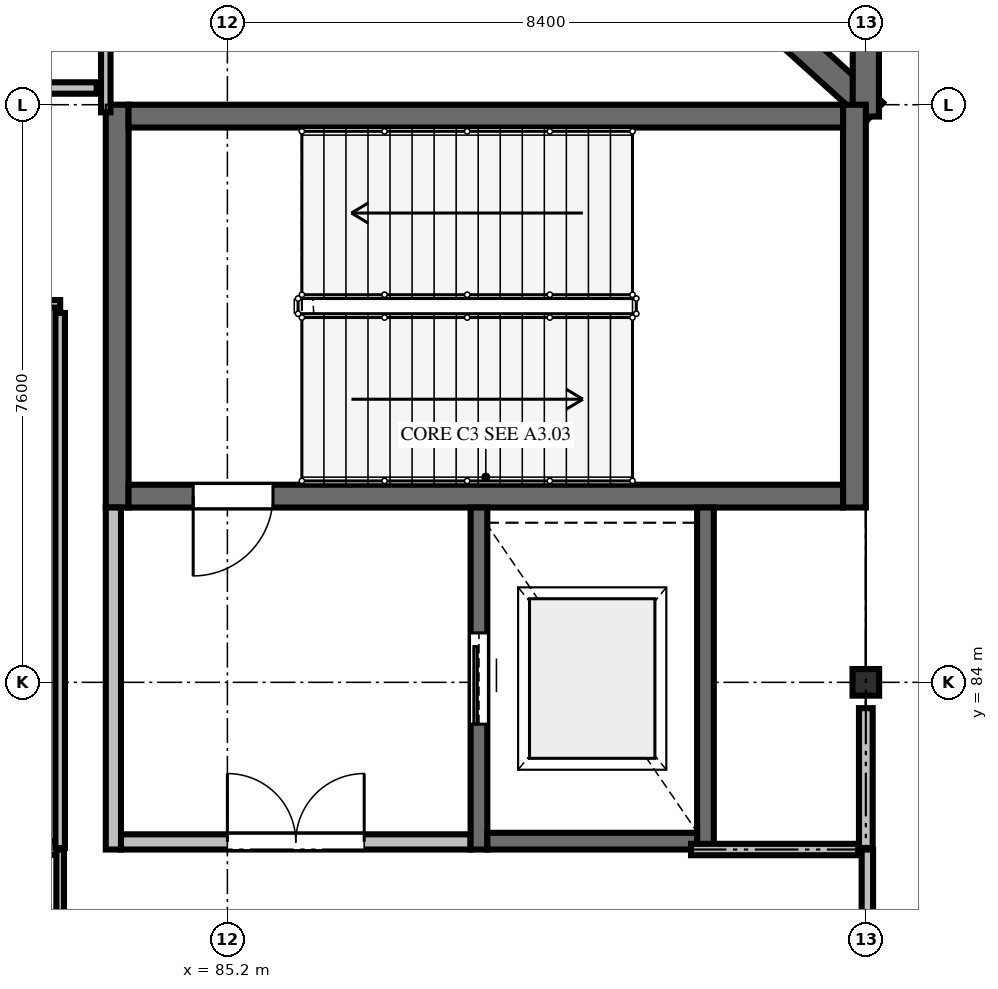
"""IFC4 building model, lengths in metres.
Left out: names, types, materials, properties, quantities, classifications, styles, units other than length and angle.
Written with IfcOpenShell. Run it as: python <this file> out.ifc"""

import sys

from ifc_helpers import new_model, si_unit, direction, frame, frame_2d, origin, origin_2d, place, context, subcontext, project, spatial, rectangle, i_section, extrude, element, fill, save


model = new_model("IFC4")
c1 = context("Model", 3, precision=1e-05, world=origin(), true_north=direction((0.0, 1.0)))
c2 = subcontext(c1, "Body", "Model", "MODEL_VIEW")
j1 = project(units=[si_unit("LENGTHUNIT", "METRE"), si_unit("PLANEANGLEUNIT", "RADIAN")], contexts=[c1])
p1 = place(None, origin())
s1 = spatial("IfcSite", under=j1, at=p1, CompositionType="ELEMENT")
p2 = place(p1, origin())
s2 = spatial("IfcBuilding", under=s1, at=p2, CompositionType="ELEMENT")
p3 = place(p2, frame((0.0, 0.0, 5.4)))
s3 = spatial("IfcBuildingStorey", under=s2, at=p3, CompositionType="ELEMENT", Elevation=5.4)
p4 = place(p3, frame((93.6, 84.0, 0.0), z_axis=(0.0, 0.0, 1.0), x_axis=(1.0, 0.0, 0.0)))
e1 = element("IfcColumn", 1, at=p4, inside=s3, PredefinedType="COLUMN", context=c2, shape_type="SweptSolid", body=[
    extrude(i_section(OverallWidth=0.35, OverallDepth=0.35, WebThickness=0.012, FlangeThickness=0.019, FilletRadius=0.013, at=origin_2d()), origin(), (0.0, 0.0, 1.0), 5.4),
])
p5 = place(p3, frame((89.277, 95.511, 0.0), z_axis=(0.0, 0.0, 1.0), x_axis=(0.741537713453, -0.670911186021, 0.0)))
e2 = element("IfcWall", 2, at=p5, inside=s3, PredefinedType="SOLIDWALL", context=c2, shape_type="SweptSolid", body=[
    extrude(rectangle(XDim=5.98, YDim=0.345, at=frame_2d((2.99, 0.0))), origin(), (0.0, 0.0, 1.0), 4.268),
])
p6 = place(p3, frame((93.6, 91.444, 0.0), z_axis=(0.0, 0.0, 1.0), x_axis=(0.0, 1.0, 0.0)))
e3 = element("IfcWall", 3, at=p6, inside=s3, PredefinedType="SOLIDWALL", context=c2, shape_type="SweptSolid", body=[
    extrude(rectangle(XDim=7.21, YDim=0.345, at=frame_2d((3.605, 0.0))), origin(), (0.0, 0.0, 1.0), 4.268),
])
for number, where, z_axis, x_axis in (
    (4, (83.75, 86.3, 0.0), (0.0, 0.0, 1.0), (0.0, 1.0, 0.0)),
    (5, (93.45, 91.6, 0.0), (0.0, 0.0, 1.0), (0.0, -1.0, 0.0)),
):
    element("IfcWall", number, at=place(p3, frame(where, z_axis=z_axis, x_axis=x_axis)), inside=s3, PredefinedType="SHEAR", context=c2, shape_type="SweptSolid", body=[
        extrude(rectangle(XDim=5.3, YDim=0.3, at=frame_2d((2.65, 0.0))), origin(), (0.0, 0.0, 1.0), 4.98),
    ])
p7 = place(p3, frame((93.3, 86.45, 0.0), z_axis=(0.0, 0.0, 1.0), x_axis=(-1.0, 0.0, 0.0)))
e6 = element("IfcWall", 6, at=p7, inside=s3, PredefinedType="SHEAR", context=c2, shape_type="SweptSolid", body=[
    extrude(rectangle(XDim=9.4, YDim=0.3, at=frame_2d((4.7, 0.0))), origin(), (0.0, 0.0, 1.0), 4.98),
])
p8 = place(p7, frame((7.5, 0.0, 0.0)))
e7 = element("IfcOpeningElement", 7, at=p8, cuts=e6, PredefinedType="OPENING", context=c2, shape_type="SweptSolid", body=[
    extrude(rectangle(XDim=1.05, YDim=2.2, at=frame_2d((0.525, 1.1))), frame((0.0, 0.16, 0.0), z_axis=(0.0, -1.0, 0.0), x_axis=(1.0, 0.0, 0.0)), (0.0, 0.0, 1.0), 0.32),
])
p9 = place(p3, frame((83.9, 91.45, 0.0), z_axis=(0.0, 0.0, 1.0), x_axis=(1.0, 0.0, 0.0)))
e8 = element("IfcWall", 8, at=p9, inside=s3, PredefinedType="SHEAR", context=c2, shape_type="SweptSolid", body=[
    extrude(rectangle(XDim=9.4, YDim=0.3, at=frame_2d((4.7, 0.0))), origin(), (0.0, 0.0, 1.0), 4.98),
])
p10 = place(p3, frame((83.8, 81.9, 0.0), z_axis=(0.0, 0.0, 1.0), x_axis=(1.0, 0.0, 0.0)))
e9 = element("IfcWall", 9, at=p10, inside=s3, PredefinedType="SOLIDWALL", context=c2, shape_type="SweptSolid", body=[
    extrude(rectangle(XDim=4.6, YDim=0.2, at=frame_2d((2.3, 0.0))), origin(), (0.0, 0.0, 1.0), 4.27),
])
p11 = place(p10, frame((1.4, 0.0, 0.0)))
e10 = element("IfcOpeningElement", 10, at=p11, cuts=e9, PredefinedType="OPENING", context=c2, shape_type="SweptSolid", body=[
    extrude(rectangle(XDim=1.8, YDim=2.2, at=frame_2d((0.9, 1.1))), frame((0.0, 0.11, 0.0), z_axis=(0.0, -1.0, 0.0), x_axis=(1.0, 0.0, 0.0)), (0.0, 0.0, 1.0), 0.22),
])
p12 = place(p3, frame((83.7, 81.8, 0.0), z_axis=(0.0, 0.0, 1.0), x_axis=(0.0, 1.0, 0.0)))
e11 = element("IfcWall", 11, at=p12, inside=s3, PredefinedType="SOLIDWALL", context=c2, shape_type="SweptSolid", body=[
    extrude(rectangle(XDim=4.5, YDim=0.2, at=frame_2d((2.25, 0.0))), origin(), (0.0, 0.0, 1.0), 4.27),
])
p13 = place(p3, frame((88.51, 81.8, 0.0), z_axis=(0.0, 0.0, 1.0), x_axis=(0.0, 1.0, 0.0)))
e12 = element("IfcWall", 12, at=p13, inside=s3, PredefinedType="SOLIDWALL", context=c2, shape_type="SweptSolid", body=[
    extrude(rectangle(XDim=4.5, YDim=0.22, at=frame_2d((2.25, 0.0))), origin(), (0.0, 0.0, 1.0), 4.98),
])
p14 = place(p13, frame((1.65, 0.0, 0.0)))
e13 = element("IfcOpeningElement", 13, at=p14, cuts=e12, PredefinedType="OPENING", context=c2, shape_type="SweptSolid", body=[
    extrude(rectangle(XDim=1.2, YDim=2.2, at=frame_2d((0.6, 1.1))), frame((0.0, 0.12, 0.0), z_axis=(0.0, -1.0, 0.0), x_axis=(1.0, 0.0, 0.0)), (0.0, 0.0, 1.0), 0.24),
])
p15 = place(p3, frame((91.49, 81.8, 0.0), z_axis=(0.0, 0.0, 1.0), x_axis=(0.0, 1.0, 0.0)))
e14 = element("IfcWall", 14, at=p15, inside=s3, PredefinedType="SOLIDWALL", context=c2, shape_type="SweptSolid", body=[
    extrude(rectangle(XDim=4.5, YDim=0.22, at=frame_2d((2.25, 0.0))), origin(), (0.0, 0.0, 1.0), 4.98),
])
p16 = place(p3, frame((88.62, 81.91, 0.0), z_axis=(0.0, 0.0, 1.0), x_axis=(1.0, 0.0, 0.0)))
e15 = element("IfcWall", 15, at=p16, inside=s3, PredefinedType="SOLIDWALL", context=c2, shape_type="SweptSolid", body=[
    extrude(rectangle(XDim=2.76, YDim=0.22, at=frame_2d((1.38, 0.0))), origin(), (0.0, 0.0, 1.0), 4.98),
])
p17 = place(p3, frame((83.6, 99.332, 0.0), z_axis=(0.0, 0.0, 1.0), x_axis=(0.0, -1.0, 0.0)))
e16 = element("IfcWall", 16, at=p17, inside=s3, PredefinedType="PARTITIONING", context=c2, shape_type="SweptSolid", body=[
    extrude(rectangle(XDim=7.832, YDim=0.125, at=frame_2d((3.916, 0.0))), origin(), (0.0, 0.0, 1.0), 4.58),
])
p18 = place(p3, frame((83.48, 91.82, 0.0), z_axis=(0.0, 0.0, 1.0), x_axis=(-1.0, 0.0, 0.0)))
e17 = element("IfcWall", 17, at=p18, inside=s3, PredefinedType="PARTITIONING", context=c2, shape_type="SweptSolid", body=[
    extrude(rectangle(XDim=13.36, YDim=0.15, at=frame_2d((6.68, 0.0))), origin(), (0.0, 0.0, 1.0), 4.47),
])
p19 = place(p18, frame((4.332, 0.0, 0.0)))
e18 = element("IfcOpeningElement", 18, at=p19, cuts=e17, PredefinedType="OPENING", context=c2, shape_type="SweptSolid", body=[
    extrude(rectangle(XDim=1.6, YDim=2.2, at=frame_2d((0.8, 1.1))), frame((0.0, 0.085, 0.0), z_axis=(0.0, -1.0, 0.0), x_axis=(1.0, 0.0, 0.0)), (0.0, 0.0, 1.0), 0.17),
])
p20 = place(p3, frame((82.98, 81.82, 0.0), z_axis=(0.0, 0.0, 1.0), x_axis=(-1.0, 0.0, 0.0)))
e19 = element("IfcWall", 19, at=p20, inside=s3, PredefinedType="PARTITIONING", context=c2, shape_type="SweptSolid", body=[
    extrude(rectangle(XDim=13.36, YDim=0.18, at=frame_2d((6.68, 0.0))), origin(), (0.0, 0.0, 1.0), 4.17),
])
p21 = place(p20, frame((6.18, 0.0, 0.0)))
e20 = element("IfcOpeningElement", 20, at=p21, cuts=e19, PredefinedType="OPENING", context=c2, shape_type="SweptSolid", body=[
    extrude(rectangle(XDim=1.0, YDim=2.15, at=frame_2d((0.5, 1.075))), frame((0.0, 0.1, 0.0), z_axis=(0.0, -1.0, 0.0), x_axis=(1.0, 0.0, 0.0)), (0.0, 0.0, 1.0), 0.2),
])
p22 = place(p3, frame((69.62, 88.98, 0.0), z_axis=(0.0, 0.0, 1.0), x_axis=(1.0, 0.0, 0.0)))
e21 = element("IfcWall", 21, at=p22, inside=s3, PredefinedType="PARTITIONING", context=c2, shape_type="SweptSolid", body=[
    extrude(rectangle(XDim=13.38, YDim=0.1, at=frame_2d((6.69, 0.0))), origin(), (0.0, 0.0, 1.0), 4.08),
])
p23 = place(p22, frame((6.19, 0.0, 0.0)))
e22 = element("IfcOpeningElement", 22, at=p23, cuts=e21, PredefinedType="OPENING", context=c2, shape_type="SweptSolid", body=[
    extrude(rectangle(XDim=1.0, YDim=2.15, at=frame_2d((0.5, 1.075))), frame((0.0, 0.06, 0.0), z_axis=(0.0, -1.0, 0.0), x_axis=(1.0, 0.0, 0.0)), (0.0, 0.0, 1.0), 0.12),
])
p24 = place(p3, frame((83.0, 88.86, 0.0), z_axis=(0.0, 0.0, 1.0), x_axis=(0.0, -1.0, 0.0)))
e23 = element("IfcWall", 23, at=p24, inside=s3, PredefinedType="PARTITIONING", context=c2, shape_type="SweptSolid", body=[
    extrude(rectangle(XDim=7.04, YDim=0.125, at=frame_2d((3.52, 0.0))), origin(), (0.0, 0.0, 1.0), 4.98),
])
p25 = place(p3, frame((93.62, 63.903, 0.0), z_axis=(0.0, 0.0, 1.0), x_axis=(0.0, 1.0, 0.0)))
e24 = element("IfcWall", 24, at=p25, inside=s3, PredefinedType="PARTITIONING", context=c2, shape_type="SweptSolid", body=[
    extrude(rectangle(XDim=17.897, YDim=0.15, at=frame_2d((8.949, 0.0))), origin(), (0.0, 0.0, 1.0), 4.12),
])
p26 = place(p25, frame((8.449, 0.0, 0.0)))
e25 = element("IfcOpeningElement", 25, at=p26, cuts=e24, PredefinedType="OPENING", context=c2, shape_type="SweptSolid", body=[
    extrude(rectangle(XDim=1.0, YDim=2.15, at=frame_2d((0.5, 1.075))), frame((0.0, 0.085, 0.0), z_axis=(0.0, -1.0, 0.0), x_axis=(1.0, 0.0, 0.0)), (0.0, 0.0, 1.0), 0.17),
])
p27 = place(p3, frame((93.6, 81.82, 0.0), z_axis=(0.0, 0.0, 1.0), x_axis=(0.0, 1.0, 0.0)))
e26 = element("IfcWall", 26, at=p27, inside=s3, PredefinedType="PARTITIONING", context=c2, shape_type="SweptSolid", body=[
    extrude(rectangle(XDim=1.84, YDim=0.18, at=frame_2d((0.92, 0.0))), origin(), (0.0, 0.0, 1.0), 4.12),
])
p28 = place(p3, frame((91.3, 81.8, 0.0), z_axis=(0.0, 0.0, 1.0), x_axis=(1.0, 0.0, 0.0)))
e27 = element("IfcWall", 27, at=p28, inside=s3, PredefinedType="PARTITIONING", context=c2, shape_type="SweptSolid", body=[
    extrude(rectangle(XDim=2.2, YDim=0.15, at=frame_2d((1.1, 0.0))), origin(), (0.0, 0.0, 1.0), 4.12),
])
p29 = place(p3, frame((83.0, 34.72, 0.0), z_axis=(0.0, 0.0, 1.0), x_axis=(0.0, 1.0, 0.0)))
e28 = element("IfcWall", 28, at=p29, inside=s3, PredefinedType="PARTITIONING", context=c2, shape_type="SweptSolid", body=[
    extrude(rectangle(XDim=47.08, YDim=0.1, at=frame_2d((23.54, 0.0))), origin(), (0.0, 0.0, 1.0), 3.47),
])
p30 = place(p29, frame((43.787, 0.0, 0.0)))
e29 = element("IfcOpeningElement", 29, at=p30, cuts=e28, PredefinedType="OPENING", context=c2, shape_type="SweptSolid", body=[
    extrude(rectangle(XDim=1.6, YDim=2.2, at=frame_2d((0.8, 1.1))), frame((0.0, 0.06, 0.0), z_axis=(0.0, -1.0, 0.0), x_axis=(1.0, 0.0, 0.0)), (0.0, 0.0, 1.0), 0.12),
])
p31 = place(p8, origin())
e30 = element("IfcDoor", 30, at=p31, inside=s3, OperationType="SINGLE_SWING_RIGHT", PredefinedType="DOOR", context=c2, shape_type="SweptSolid", body=[
    extrude(rectangle(XDim=1.05, YDim=2.2, at=frame_2d((0.525, 1.1))), frame((0.0, 0.025, 0.0), z_axis=(0.0, -1.0, 0.0), x_axis=(1.0, 0.0, 0.0)), (0.0, 0.0, 1.0), 0.05),
])
fill(e7, e30)
p32 = place(p11, origin())
e31 = element("IfcDoor", 31, at=p32, inside=s3, OperationType="DOUBLE_DOOR_SINGLE_SWING", PredefinedType="DOOR", context=c2, shape_type="SweptSolid", body=[
    extrude(rectangle(XDim=1.8, YDim=2.2, at=frame_2d((0.9, 1.1))), frame((0.0, 0.025, 0.0), z_axis=(0.0, -1.0, 0.0), x_axis=(1.0, 0.0, 0.0)), (0.0, 0.0, 1.0), 0.05),
])
fill(e10, e31)
p33 = place(p14, origin())
e32 = element("IfcDoor", 32, at=p33, inside=s3, OperationType="SLIDING_TO_LEFT", PredefinedType="DOOR", context=c2, shape_type="SweptSolid", body=[
    extrude(rectangle(XDim=1.2, YDim=2.2, at=frame_2d((0.6, 1.1))), frame((0.0, 0.025, 0.0), z_axis=(0.0, -1.0, 0.0), x_axis=(1.0, 0.0, 0.0)), (0.0, 0.0, 1.0), 0.05),
])
fill(e13, e32)
save(model, sys.argv[1])
